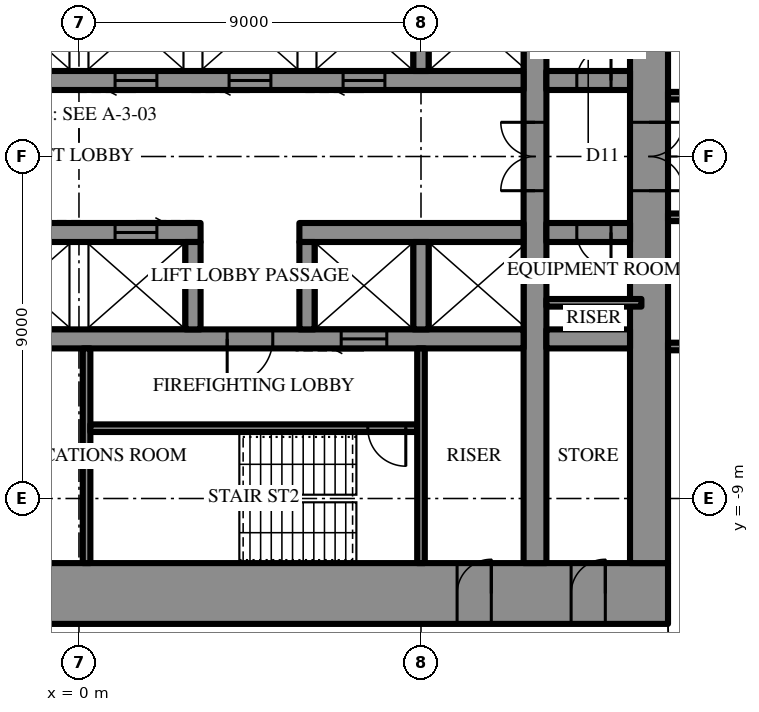
"""IFC4 building model, lengths in metres.
Left out: names, types, materials, properties, quantities, classifications, styles, units other than length and angle.
Written with IfcOpenShell. Run it as: python <this file> out.ifc"""

import sys

from ifc_helpers import new_model, si_unit, direction, frame, frame_2d, origin, place, context, subcontext, project, spatial, rectangle, extrude, element, fill, save


model = new_model("IFC4")
c1 = context("Model", 3, precision=1e-05, world=origin(), true_north=direction((0.0, 1.0)))
c2 = subcontext(c1, "Body", "Model", "MODEL_VIEW")
j1 = project(units=[si_unit("LENGTHUNIT", "METRE"), si_unit("PLANEANGLEUNIT", "RADIAN")], contexts=[c1])
p1 = place(None, origin())
s1 = spatial("IfcSite", under=j1, at=p1, CompositionType="ELEMENT")
p2 = place(p1, origin())
s2 = spatial("IfcBuilding", under=s1, at=p2, CompositionType="ELEMENT")
p3 = place(p2, frame((0.0, 0.0, 240.7)))
s3 = spatial("IfcBuildingStorey", under=s2, at=p3, CompositionType="ELEMENT", Elevation=240.7)
p4 = place(p3, frame((15.5, -11.5, 0.0), z_axis=(0.0, 0.0, 1.0), x_axis=(-1.0, 0.0, 0.0)))
e1 = element("IfcWall", 1, at=p4, inside=s3, PredefinedType="SHEAR", context=c2, shape_type="SweptSolid", body=[
    extrude(rectangle(XDim=31.0, YDim=1.6, at=frame_2d((15.5, 0.0))), origin(), (0.0, 0.0, 1.0), 4.2),
])
p5 = place(p4, frame((16.35, 0.0, 0.0)))
e2 = element("IfcOpeningElement", 2, at=p5, cuts=e1, PredefinedType="OPENING", context=c2, shape_type="SweptSolid", body=[
    extrude(rectangle(XDim=0.9, YDim=2.2, at=frame_2d((0.45, 1.1))), frame((0.0, 0.81, 0.0), z_axis=(0.0, -1.0, 0.0), x_axis=(1.0, 0.0, 0.0)), (0.0, 0.0, 1.0), 1.62),
])
p6 = place(p4, frame((19.35, 0.0, 0.0)))
e3 = element("IfcOpeningElement", 3, at=p6, cuts=e1, PredefinedType="OPENING", context=c2, shape_type="SweptSolid", body=[
    extrude(rectangle(XDim=0.9, YDim=2.2, at=frame_2d((0.45, 1.1))), frame((0.0, 0.81, 0.0), z_axis=(0.0, -1.0, 0.0), x_axis=(1.0, 0.0, 0.0)), (0.0, 0.0, 1.0), 1.62),
])
p7 = place(p4, frame((22.4, 0.0, 0.0)))
e4 = element("IfcOpeningElement", 4, at=p7, cuts=e1, PredefinedType="OPENING", context=c2, shape_type="SweptSolid", body=[
    extrude(rectangle(XDim=1.0, YDim=2.2, at=frame_2d((0.5, 1.1))), frame((0.0, 0.81, 0.0), z_axis=(0.0, -1.0, 0.0), x_axis=(1.0, 0.0, 0.0)), (0.0, 0.0, 1.0), 1.62),
])
p8 = place(p4, frame((1.65, 0.0, 0.0)))
e5 = element("IfcOpeningElement", 5, at=p8, cuts=e1, PredefinedType="OPENING", context=c2, shape_type="SweptSolid", body=[
    extrude(rectangle(XDim=0.9, YDim=2.2, at=frame_2d((0.45, 1.1))), frame((0.0, 0.81, 0.0), z_axis=(0.0, -1.0, 0.0), x_axis=(1.0, 0.0, 0.0)), (0.0, 0.0, 1.0), 1.62),
])
p9 = place(p4, frame((4.65, 0.0, 0.0)))
e6 = element("IfcOpeningElement", 6, at=p9, cuts=e1, PredefinedType="OPENING", context=c2, shape_type="SweptSolid", body=[
    extrude(rectangle(XDim=0.9, YDim=2.2, at=frame_2d((0.45, 1.1))), frame((0.0, 0.81, 0.0), z_axis=(0.0, -1.0, 0.0), x_axis=(1.0, 0.0, 0.0)), (0.0, 0.0, 1.0), 1.62),
])
p10 = place(p4, frame((25.45, 0.0, 0.0)))
e7 = element("IfcOpeningElement", 7, at=p10, cuts=e1, PredefinedType="OPENING", context=c2, shape_type="SweptSolid", body=[
    extrude(rectangle(XDim=0.9, YDim=2.2, at=frame_2d((0.45, 1.1))), frame((0.0, 0.81, 0.0), z_axis=(0.0, -1.0, 0.0), x_axis=(1.0, 0.0, 0.0)), (0.0, 0.0, 1.0), 1.62),
])
p11 = place(p4, frame((28.45, 0.0, 0.0)))
e8 = element("IfcOpeningElement", 8, at=p11, cuts=e1, PredefinedType="OPENING", context=c2, shape_type="SweptSolid", body=[
    extrude(rectangle(XDim=0.9, YDim=2.2, at=frame_2d((0.45, 1.1))), frame((0.0, 0.81, 0.0), z_axis=(0.0, -1.0, 0.0), x_axis=(1.0, 0.0, 0.0)), (0.0, 0.0, 1.0), 1.62),
])
p12 = place(p3, frame((15.0, -10.7, 0.0), z_axis=(0.0, 0.0, 1.0), x_axis=(0.0, 1.0, 0.0)))
e9 = element("IfcWall", 9, at=p12, inside=s3, PredefinedType="SHEAR", context=c2, shape_type="SweptSolid", body=[
    extrude(rectangle(XDim=21.4, YDim=1.0, at=frame_2d((10.7, 0.0))), origin(), (0.0, 0.0, 1.0), 4.2),
])
p13 = place(p12, frame((9.8, 0.0, 0.0)))
e10 = element("IfcOpeningElement", 10, at=p13, cuts=e9, PredefinedType="OPENING", context=c2, shape_type="SweptSolid", body=[
    extrude(rectangle(XDim=1.8, YDim=2.4, at=frame_2d((0.9, 1.2))), frame((0.0, 0.51, 0.0), z_axis=(0.0, -1.0, 0.0), x_axis=(1.0, 0.0, 0.0)), (0.0, 0.0, 1.0), 1.02),
])
p14 = place(p3, frame((12.0, -10.7, 0.0), z_axis=(0.0, 0.0, 1.0), x_axis=(0.0, 1.0, 0.0)))
e11 = element("IfcWall", 11, at=p14, inside=s3, PredefinedType="SHEAR", context=c2, shape_type="SweptSolid", body=[
    extrude(rectangle(XDim=21.4, YDim=0.6, at=frame_2d((10.7, 0.0))), origin(), (0.0, 0.0, 1.0), 4.2),
])
p15 = place(p14, frame((9.8, 0.0, 0.0)))
e12 = element("IfcOpeningElement", 12, at=p15, cuts=e11, PredefinedType="OPENING", context=c2, shape_type="SweptSolid", body=[
    extrude(rectangle(XDim=1.8, YDim=2.4, at=frame_2d((0.9, 1.2))), frame((0.0, 0.31, 0.0), z_axis=(0.0, -1.0, 0.0), x_axis=(1.0, 0.0, 0.0)), (0.0, 0.0, 1.0), 0.62),
])
p16 = place(p3, frame((-3.2, 2.0, 0.0), z_axis=(0.0, 0.0, 1.0), x_axis=(1.0, 0.0, 0.0)))
e13 = element("IfcWall", 13, at=p16, inside=s3, PredefinedType="SHEAR", context=c2, shape_type="SweptSolid", body=[
    extrude(rectangle(XDim=14.9, YDim=0.5, at=frame_2d((7.45, 0.0))), origin(), (0.0, 0.0, 1.0), 4.2),
])
p17 = place(p16, frame((1.15, 0.0, 0.0)))
e14 = element("IfcOpeningElement", 14, at=p17, cuts=e13, PredefinedType="OPENING", context=c2, shape_type="SweptSolid", body=[
    extrude(rectangle(XDim=1.1, YDim=2.2, at=frame_2d((0.55, 1.1))), frame((0.0, 0.26, 0.0), z_axis=(0.0, -1.0, 0.0), x_axis=(1.0, 0.0, 0.0)), (0.0, 0.0, 1.0), 0.52),
])
p18 = place(p16, frame((4.15, 0.0, 0.0)))
e15 = element("IfcOpeningElement", 15, at=p18, cuts=e13, PredefinedType="OPENING", context=c2, shape_type="SweptSolid", body=[
    extrude(rectangle(XDim=1.1, YDim=2.2, at=frame_2d((0.55, 1.1))), frame((0.0, 0.26, 0.0), z_axis=(0.0, -1.0, 0.0), x_axis=(1.0, 0.0, 0.0)), (0.0, 0.0, 1.0), 0.52),
])
p19 = place(p16, frame((7.15, 0.0, 0.0)))
e16 = element("IfcOpeningElement", 16, at=p19, cuts=e13, PredefinedType="OPENING", context=c2, shape_type="SweptSolid", body=[
    extrude(rectangle(XDim=1.1, YDim=2.2, at=frame_2d((0.55, 1.1))), frame((0.0, 0.26, 0.0), z_axis=(0.0, -1.0, 0.0), x_axis=(1.0, 0.0, 0.0)), (0.0, 0.0, 1.0), 0.52),
])
p20 = place(p16, frame((10.15, 0.0, 0.0)))
e17 = element("IfcOpeningElement", 17, at=p20, cuts=e13, PredefinedType="OPENING", context=c2, shape_type="SweptSolid", body=[
    extrude(rectangle(XDim=1.1, YDim=2.2, at=frame_2d((0.55, 1.1))), frame((0.0, 0.26, 0.0), z_axis=(0.0, -1.0, 0.0), x_axis=(1.0, 0.0, 0.0)), (0.0, 0.0, 1.0), 0.52),
])
p21 = place(p3, frame((12.3, 2.0, 0.0), z_axis=(0.0, 0.0, 1.0), x_axis=(1.0, 0.0, 0.0)))
e18 = element("IfcWall", 18, at=p21, inside=s3, PredefinedType="SHEAR", context=c2, shape_type="SweptSolid", body=[
    extrude(rectangle(XDim=2.2, YDim=0.5, at=frame_2d((1.1, 0.0))), origin(), (0.0, 0.0, 1.0), 4.2),
])
p22 = place(p21, frame((0.8, 0.0, 0.0)))
e19 = element("IfcOpeningElement", 19, at=p22, cuts=e18, PredefinedType="OPENING", context=c2, shape_type="SweptSolid", body=[
    extrude(rectangle(XDim=0.9, YDim=2.2, at=frame_2d((0.45, 1.1))), frame((0.0, 0.26, 0.0), z_axis=(0.0, -1.0, 0.0), x_axis=(1.0, 0.0, 0.0)), (0.0, 0.0, 1.0), 0.52),
])
p23 = place(p3, frame((9.0, 2.25, 0.0), z_axis=(0.0, 0.0, 1.0), x_axis=(0.0, 1.0, 0.0)))
e20 = element("IfcWall", 20, at=p23, inside=s3, PredefinedType="SHEAR", context=c2, shape_type="SweptSolid", body=[
    extrude(rectangle(XDim=2.3, YDim=0.4, at=frame_2d((1.15, 0.0))), origin(), (0.0, 0.0, 1.0), 4.2),
])
p24 = place(p3, frame((14.5, -2.0, 0.0), z_axis=(0.0, 0.0, 1.0), x_axis=(-1.0, 0.0, 0.0)))
e21 = element("IfcWall", 21, at=p24, inside=s3, PredefinedType="SHEAR", context=c2, shape_type="SweptSolid", body=[
    extrude(rectangle(XDim=2.2, YDim=0.5, at=frame_2d((1.1, 0.0))), origin(), (0.0, 0.0, 1.0), 4.2),
])
p25 = place(p24, frame((0.5, 0.0, 0.0)))
e22 = element("IfcOpeningElement", 22, at=p25, cuts=e21, PredefinedType="OPENING", context=c2, shape_type="SweptSolid", body=[
    extrude(rectangle(XDim=0.9, YDim=2.2, at=frame_2d((0.45, 1.1))), frame((0.0, 0.26, 0.0), z_axis=(0.0, -1.0, 0.0), x_axis=(1.0, 0.0, 0.0)), (0.0, 0.0, 1.0), 0.52),
])
p26 = place(p3, frame((11.7, -2.0, 0.0), z_axis=(0.0, 0.0, 1.0), x_axis=(-1.0, 0.0, 0.0)))
e23 = element("IfcWall", 23, at=p26, inside=s3, PredefinedType="SHEAR", context=c2, shape_type="SweptSolid", body=[
    extrude(rectangle(XDim=5.9, YDim=0.5, at=frame_2d((2.95, 0.0))), origin(), (0.0, 0.0, 1.0), 4.2),
])
p27 = place(p3, frame((3.2, -2.0, 0.0), z_axis=(0.0, 0.0, 1.0), x_axis=(-1.0, 0.0, 0.0)))
e24 = element("IfcWall", 24, at=p27, inside=s3, PredefinedType="SHEAR", context=c2, shape_type="SweptSolid", body=[
    extrude(rectangle(XDim=14.9, YDim=0.5, at=frame_2d((7.45, 0.0))), origin(), (0.0, 0.0, 1.0), 4.2),
])
p28 = place(p27, frame((1.15, 0.0, 0.0)))
e25 = element("IfcOpeningElement", 25, at=p28, cuts=e24, PredefinedType="OPENING", context=c2, shape_type="SweptSolid", body=[
    extrude(rectangle(XDim=1.1, YDim=2.2, at=frame_2d((0.55, 1.1))), frame((0.0, 0.26, 0.0), z_axis=(0.0, -1.0, 0.0), x_axis=(1.0, 0.0, 0.0)), (0.0, 0.0, 1.0), 0.52),
])
p29 = place(p27, frame((4.15, 0.0, 0.0)))
e26 = element("IfcOpeningElement", 26, at=p29, cuts=e24, PredefinedType="OPENING", context=c2, shape_type="SweptSolid", body=[
    extrude(rectangle(XDim=1.1, YDim=2.2, at=frame_2d((0.55, 1.1))), frame((0.0, 0.26, 0.0), z_axis=(0.0, -1.0, 0.0), x_axis=(1.0, 0.0, 0.0)), (0.0, 0.0, 1.0), 0.52),
])
p30 = place(p27, frame((7.15, 0.0, 0.0)))
e27 = element("IfcOpeningElement", 27, at=p30, cuts=e24, PredefinedType="OPENING", context=c2, shape_type="SweptSolid", body=[
    extrude(rectangle(XDim=1.1, YDim=2.2, at=frame_2d((0.55, 1.1))), frame((0.0, 0.26, 0.0), z_axis=(0.0, -1.0, 0.0), x_axis=(1.0, 0.0, 0.0)), (0.0, 0.0, 1.0), 0.52),
])
p31 = place(p27, frame((10.15, 0.0, 0.0)))
e28 = element("IfcOpeningElement", 28, at=p31, cuts=e24, PredefinedType="OPENING", context=c2, shape_type="SweptSolid", body=[
    extrude(rectangle(XDim=1.1, YDim=2.2, at=frame_2d((0.55, 1.1))), frame((0.0, 0.26, 0.0), z_axis=(0.0, -1.0, 0.0), x_axis=(1.0, 0.0, 0.0)), (0.0, 0.0, 1.0), 0.52),
])
p32 = place(p3, frame((14.5, -4.8, 0.0), z_axis=(0.0, 0.0, 1.0), x_axis=(-1.0, 0.0, 0.0)))
e29 = element("IfcWall", 29, at=p32, inside=s3, PredefinedType="SHEAR", context=c2, shape_type="SweptSolid", body=[
    extrude(rectangle(XDim=2.2, YDim=0.5, at=frame_2d((1.1, 0.0))), origin(), (0.0, 0.0, 1.0), 4.2),
])
p33 = place(p3, frame((11.7, -4.8, 0.0), z_axis=(0.0, 0.0, 1.0), x_axis=(-1.0, 0.0, 0.0)))
e30 = element("IfcWall", 30, at=p33, inside=s3, PredefinedType="SHEAR", context=c2, shape_type="SweptSolid", body=[
    extrude(rectangle(XDim=23.4, YDim=0.5, at=frame_2d((11.7, 0.0))), origin(), (0.0, 0.0, 1.0), 4.2),
])
p34 = place(p33, frame((6.6, 0.0, 0.0)))
e31 = element("IfcOpeningElement", 31, at=p34, cuts=e30, PredefinedType="OPENING", context=c2, shape_type="SweptSolid", body=[
    extrude(rectangle(XDim=1.2, YDim=2.2, at=frame_2d((0.6, 1.1))), frame((0.0, 0.26, 0.0), z_axis=(0.0, -1.0, 0.0), x_axis=(1.0, 0.0, 0.0)), (0.0, 0.0, 1.0), 0.52),
])
p35 = place(p33, frame((3.6, 0.0, 0.0)))
e32 = element("IfcOpeningElement", 32, at=p35, cuts=e30, PredefinedType="OPENING", context=c2, shape_type="SweptSolid", body=[
    extrude(rectangle(XDim=1.2, YDim=2.2, at=frame_2d((0.6, 1.1))), frame((0.0, 0.26, 0.0), z_axis=(0.0, -1.0, 0.0), x_axis=(1.0, 0.0, 0.0)), (0.0, 0.0, 1.0), 0.52),
])
for number, where, z_axis, x_axis in (
    (33, (9.0, -2.25, 0.0), (0.0, 0.0, 1.0), (0.0, -1.0, 0.0)),
    (34, (6.0, -2.25, 0.0), (0.0, 0.0, 1.0), (0.0, -1.0, 0.0)),
    (35, (3.0, -2.25, 0.0), (0.0, 0.0, 1.0), (0.0, -1.0, 0.0)),
):
    element("IfcWall", number, at=place(p3, frame(where, z_axis=z_axis, x_axis=x_axis)), inside=s3, PredefinedType="SHEAR", context=c2, shape_type="SweptSolid", body=[
        extrude(rectangle(XDim=2.3, YDim=0.4, at=frame_2d((1.15, 0.0))), origin(), (0.0, 0.0, 1.0), 4.2),
    ])
p36 = place(p3, frame((0.2, -5.05, 0.0), z_axis=(0.0, 0.0, 1.0), x_axis=(0.0, -1.0, 0.0)))
e36 = element("IfcWall", 36, at=p36, inside=s3, PredefinedType="SHEAR", context=c2, shape_type="SweptSolid", body=[
    extrude(rectangle(XDim=5.65, YDim=0.2, at=frame_2d((2.825, 0.0))), origin(), (0.0, 0.0, 1.0), 4.2),
])
p37 = place(p3, frame((8.9, -7.15, 0.0), z_axis=(0.0, 0.0, 1.0), x_axis=(-1.0, 0.0, 0.0)))
e37 = element("IfcWall", 37, at=p37, inside=s3, PredefinedType="SHEAR", context=c2, shape_type="SweptSolid", body=[
    extrude(rectangle(XDim=8.6, YDim=0.2, at=frame_2d((4.3, 0.0))), origin(), (0.0, 0.0, 1.0), 4.2),
])
p38 = place(p37, frame((0.3, 0.0, 0.0)))
e38 = element("IfcOpeningElement", 38, at=p38, cuts=e37, PredefinedType="OPENING", context=c2, shape_type="SweptSolid", body=[
    extrude(rectangle(XDim=1.0, YDim=2.2, at=frame_2d((0.5, 1.1))), frame((0.0, 0.11, 0.0), z_axis=(0.0, -1.0, 0.0), x_axis=(1.0, 0.0, 0.0)), (0.0, 0.0, 1.0), 0.22),
])
p39 = place(p3, frame((9.0, -5.05, 0.0), z_axis=(0.0, 0.0, 1.0), x_axis=(0.0, -1.0, 0.0)))
e39 = element("IfcWall", 39, at=p39, inside=s3, PredefinedType="PARTITIONING", context=c2, shape_type="SweptSolid", body=[
    extrude(rectangle(XDim=5.65, YDim=0.2, at=frame_2d((2.825, 0.0))), origin(), (0.0, 0.0, 1.0), 4.0),
])
p40 = place(p3, frame((14.8, -3.85, 0.0), z_axis=(0.0, 0.0, 1.0), x_axis=(-1.0, 0.0, 0.0)))
e40 = element("IfcWall", 40, at=p40, inside=s3, PredefinedType="PARTITIONING", context=c2, shape_type="SweptSolid", body=[
    extrude(rectangle(XDim=2.5, YDim=0.2, at=frame_2d((1.25, 0.0))), origin(), (0.0, 0.0, 1.0), 4.0),
])
p41 = place(p3, frame((15.5, 1.6, 0.0), z_axis=(0.0, 0.0, 1.0), x_axis=(1.0, 0.0, 0.0)))
e41 = element("IfcWall", 41, at=p41, inside=s3, PredefinedType="PARTITIONING", context=c2, shape_type="SweptSolid", body=[
    extrude(rectangle(XDim=11.7, YDim=0.2, at=frame_2d((5.85, 0.0))), origin(), (0.0, 0.0, 1.0), 4.0),
])
p42 = place(p41, frame((3.01, 0.0, 0.0)))
e42 = element("IfcOpeningElement", 42, at=p42, cuts=e41, PredefinedType="OPENING", context=c2, shape_type="SweptSolid", body=[
    extrude(rectangle(XDim=1.0, YDim=2.2, at=frame_2d((0.5, 1.1))), frame((0.0, 0.11, 0.0), z_axis=(0.0, -1.0, 0.0), x_axis=(1.0, 0.0, 0.0)), (0.0, 0.0, 1.0), 0.22),
])
p43 = place(p3, frame((15.5, -1.6, 0.0), z_axis=(0.0, 0.0, 1.0), x_axis=(1.0, 0.0, 0.0)))
e43 = element("IfcWall", 43, at=p43, inside=s3, PredefinedType="PARTITIONING", context=c2, shape_type="SweptSolid", body=[
    extrude(rectangle(XDim=11.7, YDim=0.2, at=frame_2d((5.85, 0.0))), origin(), (0.0, 0.0, 1.0), 4.0),
])
p44 = place(p43, frame((3.01, 0.0, 0.0)))
e44 = element("IfcOpeningElement", 44, at=p44, cuts=e43, PredefinedType="OPENING", context=c2, shape_type="SweptSolid", body=[
    extrude(rectangle(XDim=1.0, YDim=2.2, at=frame_2d((0.5, 1.1))), frame((0.0, 0.11, 0.0), z_axis=(0.0, -1.0, 0.0), x_axis=(1.0, 0.0, 0.0)), (0.0, 0.0, 1.0), 0.22),
])
p45 = place(p3, frame((15.5, -5.0, 0.0), z_axis=(0.0, 0.0, 1.0), x_axis=(1.0, 0.0, 0.0)))
e45 = element("IfcWall", 45, at=p45, inside=s3, PredefinedType="PARTITIONING", context=c2, shape_type="SweptSolid", body=[
    extrude(rectangle(XDim=14.845, YDim=0.2, at=frame_2d((7.423, 0.0))), origin(), (0.0, 0.0, 1.0), 4.0),
])
p46 = place(p45, frame((0.985, 0.0, 0.0)))
e46 = element("IfcOpeningElement", 46, at=p46, cuts=e45, PredefinedType="OPENING", context=c2, shape_type="SweptSolid", body=[
    extrude(rectangle(XDim=1.0, YDim=2.2, at=frame_2d((0.5, 1.1))), frame((0.0, 0.11, 0.0), z_axis=(0.0, -1.0, 0.0), x_axis=(1.0, 0.0, 0.0)), (0.0, 0.0, 1.0), 0.22),
])
p47 = place(p13, frame((1.8, 0.0, 0.0), z_axis=(0.0, 0.0, 1.0), x_axis=(-1.0, 0.0, 0.0)))
e47 = element("IfcDoor", 47, at=p47, inside=s3, OperationType="DOUBLE_DOOR_SINGLE_SWING", PredefinedType="DOOR", context=c2, shape_type="SweptSolid", body=[
    extrude(rectangle(XDim=1.8, YDim=2.4, at=frame_2d((0.9, 1.2))), frame((0.0, 0.025, 0.0), z_axis=(0.0, -1.0, 0.0), x_axis=(1.0, 0.0, 0.0)), (0.0, 0.0, 1.0), 0.05),
])
fill(e10, e47)
p48 = place(p34, origin())
e48 = element("IfcDoor", 48, at=p48, inside=s3, OperationType="SINGLE_SWING_LEFT", PredefinedType="DOOR", context=c2, shape_type="SweptSolid", body=[
    extrude(rectangle(XDim=1.2, YDim=2.2, at=frame_2d((0.6, 1.1))), frame((0.0, 0.025, 0.0), z_axis=(0.0, -1.0, 0.0), x_axis=(1.0, 0.0, 0.0)), (0.0, 0.0, 1.0), 0.05),
])
fill(e31, e48)
p49 = place(p38, origin())
e49 = element("IfcDoor", 49, at=p49, inside=s3, OperationType="SINGLE_SWING_RIGHT", PredefinedType="DOOR", context=c2, shape_type="SweptSolid", body=[
    extrude(rectangle(XDim=1.0, YDim=2.2, at=frame_2d((0.5, 1.1))), frame((0.0, 0.025, 0.0), z_axis=(0.0, -1.0, 0.0), x_axis=(1.0, 0.0, 0.0)), (0.0, 0.0, 1.0), 0.05),
])
fill(e38, e49)
p50 = place(p8, frame((0.9, 0.0, 0.0), z_axis=(0.0, 0.0, 1.0), x_axis=(-1.0, 0.0, 0.0)))
e50 = element("IfcDoor", 50, at=p50, inside=s3, OperationType="SINGLE_SWING_LEFT", PredefinedType="DOOR", context=c2, shape_type="SweptSolid", body=[
    extrude(rectangle(XDim=0.9, YDim=2.2, at=frame_2d((0.45, 1.1))), frame((0.0, 0.025, 0.0), z_axis=(0.0, -1.0, 0.0), x_axis=(1.0, 0.0, 0.0)), (0.0, 0.0, 1.0), 0.05),
])
fill(e5, e50)
p51 = place(p9, frame((0.9, 0.0, 0.0), z_axis=(0.0, 0.0, 1.0), x_axis=(-1.0, 0.0, 0.0)))
e51 = element("IfcDoor", 51, at=p51, inside=s3, OperationType="SINGLE_SWING_LEFT", PredefinedType="DOOR", context=c2, shape_type="SweptSolid", body=[
    extrude(rectangle(XDim=0.9, YDim=2.2, at=frame_2d((0.45, 1.1))), frame((0.0, 0.025, 0.0), z_axis=(0.0, -1.0, 0.0), x_axis=(1.0, 0.0, 0.0)), (0.0, 0.0, 1.0), 0.05),
])
fill(e6, e51)
p52 = place(p22, origin())
e52 = element("IfcDoor", 52, at=p52, inside=s3, OperationType="SINGLE_SWING_LEFT", PredefinedType="DOOR", context=c2, shape_type="SweptSolid", body=[
    extrude(rectangle(XDim=0.9, YDim=2.2, at=frame_2d((0.45, 1.1))), frame((0.0, 0.025, 0.0), z_axis=(0.0, -1.0, 0.0), x_axis=(1.0, 0.0, 0.0)), (0.0, 0.0, 1.0), 0.05),
])
fill(e19, e52)
p53 = place(p25, origin())
e53 = element("IfcDoor", 53, at=p53, inside=s3, OperationType="SINGLE_SWING_RIGHT", PredefinedType="DOOR", context=c2, shape_type="SweptSolid", body=[
    extrude(rectangle(XDim=0.9, YDim=2.2, at=frame_2d((0.45, 1.1))), frame((0.0, 0.025, 0.0), z_axis=(0.0, -1.0, 0.0), x_axis=(1.0, 0.0, 0.0)), (0.0, 0.0, 1.0), 0.05),
])
fill(e22, e53)
p54 = place(p15, origin())
e54 = element("IfcDoor", 54, at=p54, inside=s3, OperationType="DOUBLE_DOOR_SINGLE_SWING", PredefinedType="DOOR", context=c2, shape_type="SweptSolid", body=[
    extrude(rectangle(XDim=1.8, YDim=2.4, at=frame_2d((0.9, 1.2))), frame((0.0, 0.025, 0.0), z_axis=(0.0, -1.0, 0.0), x_axis=(1.0, 0.0, 0.0)), (0.0, 0.0, 1.0), 0.05),
])
fill(e12, e54)
p55 = place(p18, frame((1.1, 0.0, 0.0), z_axis=(0.0, 0.0, 1.0), x_axis=(-1.0, 0.0, 0.0)))
e55 = element("IfcDoor", 55, at=p55, inside=s3, OperationType="SLIDING_TO_LEFT", PredefinedType="DOOR", context=c2, shape_type="SweptSolid", body=[
    extrude(rectangle(XDim=1.1, YDim=2.2, at=frame_2d((0.55, 1.1))), frame((0.0, 0.025, 0.0), z_axis=(0.0, -1.0, 0.0), x_axis=(1.0, 0.0, 0.0)), (0.0, 0.0, 1.0), 0.05),
])
fill(e15, e55)
p56 = place(p19, frame((1.1, 0.0, 0.0), z_axis=(0.0, 0.0, 1.0), x_axis=(-1.0, 0.0, 0.0)))
e56 = element("IfcDoor", 56, at=p56, inside=s3, OperationType="SLIDING_TO_LEFT", PredefinedType="DOOR", context=c2, shape_type="SweptSolid", body=[
    extrude(rectangle(XDim=1.1, YDim=2.2, at=frame_2d((0.55, 1.1))), frame((0.0, 0.025, 0.0), z_axis=(0.0, -1.0, 0.0), x_axis=(1.0, 0.0, 0.0)), (0.0, 0.0, 1.0), 0.05),
])
fill(e16, e56)
p57 = place(p20, frame((1.1, 0.0, 0.0), z_axis=(0.0, 0.0, 1.0), x_axis=(-1.0, 0.0, 0.0)))
e57 = element("IfcDoor", 57, at=p57, inside=s3, OperationType="SLIDING_TO_LEFT", PredefinedType="DOOR", context=c2, shape_type="SweptSolid", body=[
    extrude(rectangle(XDim=1.1, YDim=2.2, at=frame_2d((0.55, 1.1))), frame((0.0, 0.025, 0.0), z_axis=(0.0, -1.0, 0.0), x_axis=(1.0, 0.0, 0.0)), (0.0, 0.0, 1.0), 0.05),
])
fill(e17, e57)
p58 = place(p35, origin())
e58 = element("IfcDoor", 58, at=p58, inside=s3, OperationType="SLIDING_TO_LEFT", PredefinedType="DOOR", context=c2, shape_type="SweptSolid", body=[
    extrude(rectangle(XDim=1.2, YDim=2.2, at=frame_2d((0.6, 1.1))), frame((0.0, 0.025, 0.0), z_axis=(0.0, -1.0, 0.0), x_axis=(1.0, 0.0, 0.0)), (0.0, 0.0, 1.0), 0.05),
])
fill(e32, e58)
p59 = place(p28, frame((1.1, 0.0, 0.0), z_axis=(0.0, 0.0, 1.0), x_axis=(-1.0, 0.0, 0.0)))
e59 = element("IfcDoor", 59, at=p59, inside=s3, OperationType="SLIDING_TO_LEFT", PredefinedType="DOOR", context=c2, shape_type="SweptSolid", body=[
    extrude(rectangle(XDim=1.1, YDim=2.2, at=frame_2d((0.55, 1.1))), frame((0.0, 0.025, 0.0), z_axis=(0.0, -1.0, 0.0), x_axis=(1.0, 0.0, 0.0)), (0.0, 0.0, 1.0), 0.05),
])
fill(e25, e59)
save(model, sys.argv[1])
